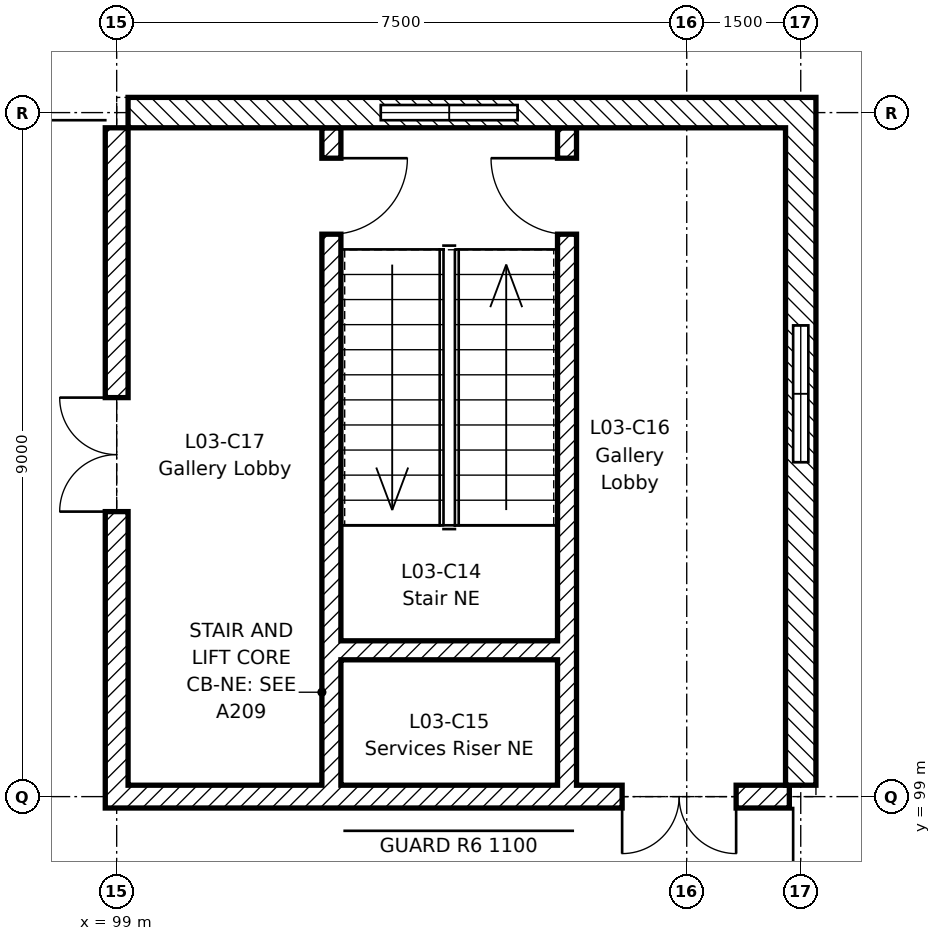
"""IFC4 building model, lengths in metres.
Left out: names, types, materials, properties, quantities, classifications, styles, units other than length and angle.
Written with IfcOpenShell. Run it as: python <this file> out.ifc"""

import sys

from ifc_helpers import new_model, si_unit, direction, frame, frame_2d, origin, place, context, subcontext, project, spatial, rectangle, extrude, element, fill, save


model = new_model("IFC4")
c1 = context("Model", 3, precision=1e-05, world=origin(), true_north=direction((0.0, 1.0)))
c2 = subcontext(c1, "Body", "Model", "MODEL_VIEW")
j1 = project(units=[si_unit("LENGTHUNIT", "METRE"), si_unit("PLANEANGLEUNIT", "RADIAN")], contexts=[c1])
p1 = place(None, origin())
s1 = spatial("IfcSite", under=j1, at=p1, CompositionType="ELEMENT")
p2 = place(p1, origin())
s2 = spatial("IfcBuilding", under=s1, at=p2, CompositionType="ELEMENT")
p3 = place(p2, frame((0.0, 0.0, 14.4)))
s3 = spatial("IfcBuildingStorey", under=s2, at=p3, CompositionType="ELEMENT", Elevation=14.4)
p4 = place(p3, frame((98.657, 95.678, -0.2), z_axis=(0.0, 0.0, 1.0), x_axis=(-0.707106781187, 0.707106781187, 0.0)))
e1 = element("IfcWall", 1, at=p4, inside=s3, PredefinedType="SHEAR", context=c2, shape_type="SweptSolid", body=[
    extrude(rectangle(XDim=4.213, YDim=1.0, at=frame_2d((2.106, 0.0))), origin(), (0.0, 0.0, 1.0), 4.2),
])
p5 = place(p4, frame((1.356, 0.0, 0.2)))
e2 = element("IfcOpeningElement", 2, at=p5, cuts=e1, PredefinedType="OPENING", context=c2, shape_type="SweptSolid", body=[
    extrude(rectangle(XDim=1.5, YDim=2.4, at=frame_2d((0.75, 1.2))), frame((0.0, 0.51, 0.0), z_axis=(0.0, -1.0, 0.0), x_axis=(1.0, 0.0, 0.0)), (0.0, 0.0, 1.0), 1.02),
])
p6 = place(p3, frame((107.85, 99.0, 0.0), z_axis=(0.0, 0.0, 1.0), x_axis=(-1.0, 0.0, 0.0)))
e3 = element("IfcWall", 3, at=p6, inside=s3, PredefinedType="SHEAR", context=c2, shape_type="SweptSolid", body=[
    extrude(rectangle(XDim=9.0, YDim=0.3, at=frame_2d((4.5, 0.0))), origin(), (0.0, 0.0, 1.0), 4.0),
])
p7 = place(p6, frame((0.7, 0.0, 0.0)))
e4 = element("IfcOpeningElement", 4, at=p7, cuts=e3, PredefinedType="OPENING", context=c2, shape_type="SweptSolid", body=[
    extrude(rectangle(XDim=1.5, YDim=2.4, at=frame_2d((0.75, 1.2))), frame((0.0, 0.16, 0.0), z_axis=(0.0, -1.0, 0.0), x_axis=(1.0, 0.0, 0.0)), (0.0, 0.0, 1.0), 0.32),
])
p8 = place(p3, frame((99.0, 107.8, 0.0), z_axis=(0.0, 0.0, 1.0), x_axis=(0.0, -1.0, 0.0)))
e5 = element("IfcWall", 5, at=p8, inside=s3, PredefinedType="SHEAR", context=c2, shape_type="SweptSolid", body=[
    extrude(rectangle(XDim=8.65, YDim=0.3, at=frame_2d((4.325, 0.0))), origin(), (0.0, 0.0, 1.0), 4.0),
])
p9 = place(p8, frame((3.55, 0.0, 0.0)))
e6 = element("IfcOpeningElement", 6, at=p9, cuts=e5, PredefinedType="OPENING", context=c2, shape_type="SweptSolid", body=[
    extrude(rectangle(XDim=1.5, YDim=2.4, at=frame_2d((0.75, 1.2))), frame((0.0, 0.16, 0.0), z_axis=(0.0, -1.0, 0.0), x_axis=(1.0, 0.0, 0.0)), (0.0, 0.0, 1.0), 0.32),
])
p10 = place(p3, frame((104.925, 107.8, 0.0), z_axis=(0.0, 0.0, 1.0), x_axis=(0.0, -1.0, 0.0)))
e7 = element("IfcWall", 7, at=p10, inside=s3, PredefinedType="SHEAR", context=c2, shape_type="SweptSolid", body=[
    extrude(rectangle(XDim=8.65, YDim=0.25, at=frame_2d((4.325, 0.0))), origin(), (0.0, 0.0, 1.0), 4.0),
])
p11 = place(p10, frame((0.4, 0.0, 0.0)))
e8 = element("IfcOpeningElement", 8, at=p11, cuts=e7, PredefinedType="OPENING", context=c2, shape_type="SweptSolid", body=[
    extrude(rectangle(XDim=1.0, YDim=2.1, at=frame_2d((0.5, 1.05))), frame((0.0, 0.135, 0.0), z_axis=(0.0, -1.0, 0.0), x_axis=(1.0, 0.0, 0.0)), (0.0, 0.0, 1.0), 0.27),
])
p12 = place(p3, frame((101.825, 107.8, 0.0), z_axis=(0.0, 0.0, 1.0), x_axis=(0.0, -1.0, 0.0)))
e9 = element("IfcWall", 9, at=p12, inside=s3, PredefinedType="SHEAR", context=c2, shape_type="SweptSolid", body=[
    extrude(rectangle(XDim=8.65, YDim=0.25, at=frame_2d((4.325, 0.0))), origin(), (0.0, 0.0, 1.0), 4.0),
])
p13 = place(p12, frame((0.4, 0.0, 0.0)))
e10 = element("IfcOpeningElement", 10, at=p13, cuts=e9, PredefinedType="OPENING", context=c2, shape_type="SweptSolid", body=[
    extrude(rectangle(XDim=1.0, YDim=2.1, at=frame_2d((0.5, 1.05))), frame((0.0, 0.135, 0.0), z_axis=(0.0, -1.0, 0.0), x_axis=(1.0, 0.0, 0.0)), (0.0, 0.0, 1.0), 0.27),
])
p14 = place(p3, frame((104.8, 100.925, 0.0), z_axis=(0.0, 0.0, 1.0), x_axis=(-1.0, 0.0, 0.0)))
e11 = element("IfcWall", 11, at=p14, inside=s3, PredefinedType="SHEAR", context=c2, shape_type="SweptSolid", body=[
    extrude(rectangle(XDim=2.85, YDim=0.25, at=frame_2d((1.425, 0.0))), origin(), (0.0, 0.0, 1.0), 4.0),
])
p15 = place(p3, frame((99.15, 108.0, 0.0), z_axis=(0.0, 0.0, 1.0), x_axis=(1.0, 0.0, 0.0)))
e12 = element("IfcWall", 12, at=p15, inside=s3, PredefinedType="STANDARD", context=c2, shape_type="SweptSolid", body=[
    extrude(rectangle(XDim=3.325, YDim=0.4, at=frame_2d((1.663, 0.0))), origin(), (0.0, 0.0, 1.0), 4.0),
])
p16 = place(p3, frame((104.275, 108.0, 0.0), z_axis=(0.0, 0.0, 1.0), x_axis=(1.0, 0.0, 0.0)))
e13 = element("IfcWall", 13, at=p16, inside=s3, PredefinedType="STANDARD", context=c2, shape_type="SweptSolid", body=[
    extrude(rectangle(XDim=3.925, YDim=0.4, at=frame_2d((1.962, 0.0))), origin(), (0.0, 0.0, 1.0), 4.0),
])
p17 = place(p3, frame((102.475, 108.0, 0.0), z_axis=(0.0, 0.0, 1.0), x_axis=(1.0, 0.0, 0.0)))
e14 = element("IfcWall", 14, at=p17, inside=s3, PredefinedType="STANDARD", context=c2, shape_type="SweptSolid", body=[
    extrude(rectangle(XDim=1.8, YDim=0.4, at=frame_2d((0.9, 0.0))), origin(), (0.0, 0.0, 1.0), 0.9),
])
p18 = place(p3, frame((108.0, 99.15, 0.0), z_axis=(0.0, 0.0, 1.0), x_axis=(0.0, 1.0, 0.0)))
e15 = element("IfcWall", 15, at=p18, inside=s3, PredefinedType="STANDARD", context=c2, shape_type="SweptSolid", body=[
    extrude(rectangle(XDim=4.25, YDim=0.4, at=frame_2d((2.125, 0.0))), origin(), (0.0, 0.0, 1.0), 4.0),
])
p19 = place(p3, frame((108.0, 105.2, 0.0), z_axis=(0.0, 0.0, 1.0), x_axis=(0.0, 1.0, 0.0)))
e16 = element("IfcWall", 16, at=p19, inside=s3, PredefinedType="STANDARD", context=c2, shape_type="SweptSolid", body=[
    extrude(rectangle(XDim=2.6, YDim=0.4, at=frame_2d((1.3, 0.0))), origin(), (0.0, 0.0, 1.0), 4.0),
])
p20 = place(p3, frame((108.0, 103.4, 0.0), z_axis=(0.0, 0.0, 1.0), x_axis=(0.0, 1.0, 0.0)))
e17 = element("IfcWall", 17, at=p20, inside=s3, PredefinedType="STANDARD", context=c2, shape_type="SweptSolid", body=[
    extrude(rectangle(XDim=1.8, YDim=0.4, at=frame_2d((0.9, 0.0))), origin(), (0.0, 0.0, 1.0), 0.9),
])
p21 = place(p11, frame((1.0, 0.0, 0.0), z_axis=(0.0, 0.0, 1.0), x_axis=(-1.0, 0.0, 0.0)))
e18 = element("IfcDoor", 18, at=p21, inside=s3, OperationType="SINGLE_SWING_RIGHT", PredefinedType="DOOR", context=c2, shape_type="SweptSolid", body=[
    extrude(rectangle(XDim=1.0, YDim=2.1, at=frame_2d((0.5, 1.05))), frame((0.0, 0.025, 0.0), z_axis=(0.0, -1.0, 0.0), x_axis=(1.0, 0.0, 0.0)), (0.0, 0.0, 1.0), 0.05),
])
fill(e8, e18)
p22 = place(p7, origin())
e19 = element("IfcDoor", 19, at=p22, inside=s3, OperationType="DOUBLE_DOOR_SINGLE_SWING", PredefinedType="DOOR", context=c2, shape_type="SweptSolid", body=[
    extrude(rectangle(XDim=1.5, YDim=2.4, at=frame_2d((0.75, 1.2))), frame((0.0, 0.025, 0.0), z_axis=(0.0, -1.0, 0.0), x_axis=(1.0, 0.0, 0.0)), (0.0, 0.0, 1.0), 0.05),
])
fill(e4, e19)
p23 = place(p9, frame((1.5, 0.0, 0.0), z_axis=(0.0, 0.0, 1.0), x_axis=(-1.0, 0.0, 0.0)))
e20 = element("IfcDoor", 20, at=p23, inside=s3, OperationType="DOUBLE_DOOR_SINGLE_SWING", PredefinedType="DOOR", context=c2, shape_type="SweptSolid", body=[
    extrude(rectangle(XDim=1.5, YDim=2.4, at=frame_2d((0.75, 1.2))), frame((0.0, 0.025, 0.0), z_axis=(0.0, -1.0, 0.0), x_axis=(1.0, 0.0, 0.0)), (0.0, 0.0, 1.0), 0.05),
])
fill(e6, e20)
p24 = place(p13, origin())
e21 = element("IfcDoor", 21, at=p24, inside=s3, OperationType="SINGLE_SWING_LEFT", PredefinedType="DOOR", context=c2, shape_type="SweptSolid", body=[
    extrude(rectangle(XDim=1.0, YDim=2.1, at=frame_2d((0.5, 1.05))), frame((0.0, 0.025, 0.0), z_axis=(0.0, -1.0, 0.0), x_axis=(1.0, 0.0, 0.0)), (0.0, 0.0, 1.0), 0.05),
])
fill(e10, e21)
save(model, sys.argv[1])
